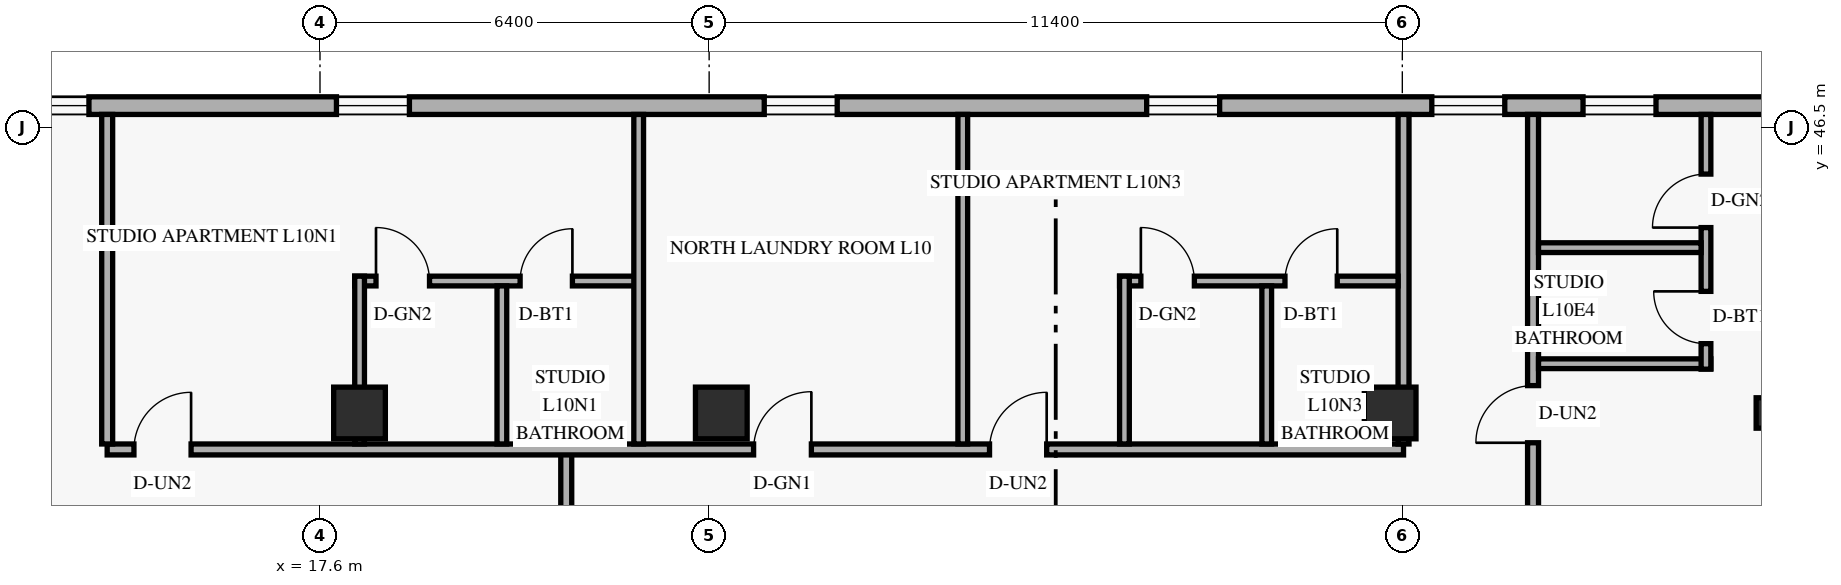
"""IFC4 building model, lengths in metres.
Left out: names, types, materials, properties, quantities, classifications, styles, units other than length and angle.
Written with IfcOpenShell. Run it as: python <this file> out.ifc"""

import sys

from ifc_helpers import new_model, si_unit, direction, frame, frame_2d, origin, origin_2d, place, context, subcontext, project, spatial, rectangle, hollow_rectangle, extrude, element, fill, save


model = new_model("IFC4")
c1 = context("Model", 3, precision=1e-05, world=origin(), true_north=direction((0.0, 1.0)))
c2 = subcontext(c1, "Body", "Model", "MODEL_VIEW")
j1 = project(units=[si_unit("LENGTHUNIT", "METRE"), si_unit("PLANEANGLEUNIT", "RADIAN")], contexts=[c1])
p1 = place(None, origin())
s1 = spatial("IfcSite", under=j1, at=p1, CompositionType="ELEMENT")
p2 = place(p1, origin())
s2 = spatial("IfcBuilding", under=s1, at=p2, CompositionType="ELEMENT")
p3 = place(p2, frame((0.0, 0.0, 42.0)))
s3 = spatial("IfcBuildingStorey", under=s2, at=p3, CompositionType="ELEMENT", Elevation=42.0)
for number, where, z_axis, x_axis in (
    (1, (18.25, 41.8, 0.0), (0.0, 0.0, 1.0), (1.0, 0.0, 0.0)),
    (2, (24.2, 41.8, 0.0), (0.0, 0.0, 1.0), (1.0, 0.0, 0.0)),
    (3, (35.2, 41.8, 0.0), (0.0, 0.0, 1.0), (1.0, 0.0, 0.0)),
):
    element("IfcColumn", number, at=place(p3, frame(where, z_axis=z_axis, x_axis=x_axis)), inside=s3, PredefinedType="COLUMN", context=c2, shape_type="SweptSolid", body=[
        extrude(rectangle(XDim=0.85, YDim=0.85, at=origin_2d()), origin(), (0.0, 0.0, 1.0), 3.6),
    ])
p4 = place(p3, frame((41.406, 41.8, 0.0), z_axis=(0.034971136209, 0.0, 0.999388322742), x_axis=(0.0, 1.0, 0.0)))
e4 = element("IfcColumn", 4, at=p4, inside=s3, PredefinedType="COLUMN", context=c2, shape_type="SweptSolid", body=[
    extrude(hollow_rectangle(XDim=0.5, YDim=0.5, WallThickness=0.022, at=origin_2d()), origin(), (0.0, 0.0, 1.0), 3.602),
])
p5 = place(p3, frame((44.98, 46.855, 0.0), z_axis=(0.0, 0.0, 1.0), x_axis=(-1.0, 0.0, 0.0)))
e5 = element("IfcWall", 5, at=p5, inside=s3, PredefinedType="SOLIDWALL", context=c2, shape_type="SweptSolid", body=[
    extrude(rectangle(XDim=39.56, YDim=0.29, at=frame_2d((19.78, 0.0))), origin(), (0.0, 0.0, 1.0), 3.36),
])
p6 = place(p5, frame((35.52, 0.0, 0.85)))
e6 = element("IfcOpeningElement", 6, at=p6, cuts=e5, PredefinedType="OPENING", context=c2, shape_type="SweptSolid", body=[
    extrude(rectangle(XDim=1.2, YDim=1.5, at=frame_2d((0.6, 0.75))), frame((0.0, 0.155, 0.0), z_axis=(0.0, -1.0, 0.0), x_axis=(1.0, 0.0, 0.0)), (0.0, 0.0, 1.0), 0.31),
])
p7 = place(p5, frame((31.18, 0.0, 0.85)))
e7 = element("IfcOpeningElement", 7, at=p7, cuts=e5, PredefinedType="OPENING", context=c2, shape_type="SweptSolid", body=[
    extrude(rectangle(XDim=1.2, YDim=1.5, at=frame_2d((0.6, 0.75))), frame((0.0, 0.155, 0.0), z_axis=(0.0, -1.0, 0.0), x_axis=(1.0, 0.0, 0.0)), (0.0, 0.0, 1.0), 0.31),
])
p8 = place(p5, frame((25.909, 0.0, 0.85)))
e8 = element("IfcOpeningElement", 8, at=p8, cuts=e5, PredefinedType="OPENING", context=c2, shape_type="SweptSolid", body=[
    extrude(rectangle(XDim=1.2, YDim=1.5, at=frame_2d((0.6, 0.75))), frame((0.0, 0.155, 0.0), z_axis=(0.0, -1.0, 0.0), x_axis=(1.0, 0.0, 0.0)), (0.0, 0.0, 1.0), 0.31),
])
p9 = place(p5, frame((18.874, 0.0, 0.85)))
e9 = element("IfcOpeningElement", 9, at=p9, cuts=e5, PredefinedType="OPENING", context=c2, shape_type="SweptSolid", body=[
    extrude(rectangle(XDim=1.2, YDim=1.5, at=frame_2d((0.6, 0.75))), frame((0.0, 0.155, 0.0), z_axis=(0.0, -1.0, 0.0), x_axis=(1.0, 0.0, 0.0)), (0.0, 0.0, 1.0), 0.31),
])
p10 = place(p5, frame((12.584, 0.0, 0.85)))
e10 = element("IfcOpeningElement", 10, at=p10, cuts=e5, PredefinedType="OPENING", context=c2, shape_type="SweptSolid", body=[
    extrude(rectangle(XDim=1.2, YDim=1.5, at=frame_2d((0.6, 0.75))), frame((0.0, 0.155, 0.0), z_axis=(0.0, -1.0, 0.0), x_axis=(1.0, 0.0, 0.0)), (0.0, 0.0, 1.0), 0.31),
])
p11 = place(p5, frame((7.895, 0.0, 0.85)))
e11 = element("IfcOpeningElement", 11, at=p11, cuts=e5, PredefinedType="OPENING", context=c2, shape_type="SweptSolid", body=[
    extrude(rectangle(XDim=1.2, YDim=1.5, at=frame_2d((0.6, 0.75))), frame((0.0, 0.155, 0.0), z_axis=(0.0, -1.0, 0.0), x_axis=(1.0, 0.0, 0.0)), (0.0, 0.0, 1.0), 0.31),
])
p12 = place(p5, frame((5.408, 0.0, 0.85)))
e12 = element("IfcOpeningElement", 12, at=p12, cuts=e5, PredefinedType="OPENING", context=c2, shape_type="SweptSolid", body=[
    extrude(rectangle(XDim=1.2, YDim=1.5, at=frame_2d((0.6, 0.75))), frame((0.0, 0.155, 0.0), z_axis=(0.0, -1.0, 0.0), x_axis=(1.0, 0.0, 0.0)), (0.0, 0.0, 1.0), 0.31),
])
p13 = place(p5, frame((1.693, 0.0, 0.85)))
e13 = element("IfcOpeningElement", 13, at=p13, cuts=e5, PredefinedType="OPENING", context=c2, shape_type="SweptSolid", body=[
    extrude(rectangle(XDim=1.2, YDim=1.5, at=frame_2d((0.6, 0.75))), frame((0.0, 0.155, 0.0), z_axis=(0.0, -1.0, 0.0), x_axis=(1.0, 0.0, 0.0)), (0.0, 0.0, 1.0), 0.31),
])
p14 = place(p3, frame((37.55, 1.29, 0.0), z_axis=(0.0, 0.0, 1.0), x_axis=(0.0, 1.0, 0.0)))
e14 = element("IfcWall", 14, at=p14, inside=s3, PredefinedType="STANDARD", context=c2, shape_type="SweptSolid", body=[
    extrude(rectangle(XDim=45.42, YDim=0.18, at=frame_2d((22.71, 0.0))), origin(), (0.0, 0.0, 1.0), 2.649),
])
p15 = place(p14, frame((4.46, 0.0, 0.0)))
e15 = element("IfcOpeningElement", 15, at=p15, cuts=e14, PredefinedType="OPENING", context=c2, shape_type="SweptSolid", body=[
    extrude(rectangle(XDim=0.94, YDim=2.15, at=frame_2d((0.47, 1.075))), frame((0.0, 0.1, 0.0), z_axis=(0.0, -1.0, 0.0), x_axis=(1.0, 0.0, 0.0)), (0.0, 0.0, 1.0), 0.2),
])
p16 = place(p14, frame((15.907, 0.0, 0.0)))
e16 = element("IfcOpeningElement", 16, at=p16, cuts=e14, PredefinedType="OPENING", context=c2, shape_type="SweptSolid", body=[
    extrude(rectangle(XDim=0.94, YDim=2.15, at=frame_2d((0.47, 1.075))), frame((0.0, 0.1, 0.0), z_axis=(0.0, -1.0, 0.0), x_axis=(1.0, 0.0, 0.0)), (0.0, 0.0, 1.0), 0.2),
])
p17 = place(p14, frame((28.23, 0.0, 0.0)))
e17 = element("IfcOpeningElement", 17, at=p17, cuts=e14, PredefinedType="OPENING", context=c2, shape_type="SweptSolid", body=[
    extrude(rectangle(XDim=0.94, YDim=2.15, at=frame_2d((0.47, 1.075))), frame((0.0, 0.1, 0.0), z_axis=(0.0, -1.0, 0.0), x_axis=(1.0, 0.0, 0.0)), (0.0, 0.0, 1.0), 0.2),
])
p18 = place(p14, frame((40.02, 0.0, 0.0)))
e18 = element("IfcOpeningElement", 18, at=p18, cuts=e14, PredefinedType="OPENING", context=c2, shape_type="SweptSolid", body=[
    extrude(rectangle(XDim=0.94, YDim=2.15, at=frame_2d((0.47, 1.075))), frame((0.0, 0.1, 0.0), z_axis=(0.0, -1.0, 0.0), x_axis=(1.0, 0.0, 0.0)), (0.0, 0.0, 1.0), 0.2),
])
p19 = place(p3, frame((21.65, 6.8, 0.0), z_axis=(0.0, 0.0, 1.0), x_axis=(0.0, 1.0, 0.0)))
e19 = element("IfcWall", 19, at=p19, inside=s3, PredefinedType="STANDARD", context=c2, shape_type="SweptSolid", body=[
    extrude(rectangle(XDim=34.4, YDim=0.18, at=frame_2d((17.2, 0.0))), origin(), (0.0, 0.0, 1.0), 2.649),
])
p20 = place(p3, frame((14.1, 41.2, 0.0), z_axis=(0.0, 0.0, 1.0), x_axis=(1.0, 0.0, 0.0)))
e20 = element("IfcWall", 20, at=p20, inside=s3, PredefinedType="STANDARD", context=c2, shape_type="SweptSolid", body=[
    extrude(rectangle(XDim=21.32, YDim=0.18, at=frame_2d((10.66, 0.0))), origin(), (0.0, 0.0, 1.0), 2.649),
])
p21 = place(p20, frame((0.44, 0.0, 0.0)))
e21 = element("IfcOpeningElement", 21, at=p21, cuts=e20, PredefinedType="OPENING", context=c2, shape_type="SweptSolid", body=[
    extrude(rectangle(XDim=0.94, YDim=2.15, at=frame_2d((0.47, 1.075))), frame((0.0, 0.1, 0.0), z_axis=(0.0, -1.0, 0.0), x_axis=(1.0, 0.0, 0.0)), (0.0, 0.0, 1.0), 0.2),
])
p22 = place(p20, frame((10.631, 0.0, 0.0)))
e22 = element("IfcOpeningElement", 22, at=p22, cuts=e20, PredefinedType="OPENING", context=c2, shape_type="SweptSolid", body=[
    extrude(rectangle(XDim=0.95, YDim=2.15, at=frame_2d((0.475, 1.075))), frame((0.0, 0.1, 0.0), z_axis=(0.0, -1.0, 0.0), x_axis=(1.0, 0.0, 0.0)), (0.0, 0.0, 1.0), 0.2),
])
p23 = place(p20, frame((14.511, 0.0, 0.0)))
e23 = element("IfcOpeningElement", 23, at=p23, cuts=e20, PredefinedType="OPENING", context=c2, shape_type="SweptSolid", body=[
    extrude(rectangle(XDim=0.94, YDim=2.15, at=frame_2d((0.47, 1.075))), frame((0.0, 0.1, 0.0), z_axis=(0.0, -1.0, 0.0), x_axis=(1.0, 0.0, 0.0)), (0.0, 0.0, 1.0), 0.2),
])
p24 = place(p3, frame((35.42, 41.29, 0.0), z_axis=(0.0, 0.0, 1.0), x_axis=(0.0, 1.0, 0.0)))
e24 = element("IfcWall", 24, at=p24, inside=s3, PredefinedType="PARTITIONING", context=c2, shape_type="SweptSolid", body=[
    extrude(rectangle(XDim=5.42, YDim=0.18, at=frame_2d((2.71, 0.0))), origin(), (0.0, 0.0, 1.0), 3.36),
])
p25 = place(p3, frame((14.1, 41.29, 0.0), z_axis=(0.0, 0.0, 1.0), x_axis=(0.0, 1.0, 0.0)))
e25 = element("IfcWall", 25, at=p25, inside=s3, PredefinedType="PARTITIONING", context=c2, shape_type="SweptSolid", body=[
    extrude(rectangle(XDim=5.42, YDim=0.18, at=frame_2d((2.71, 0.0))), origin(), (0.0, 0.0, 1.0), 2.809),
])
p26 = place(p3, frame((37.64, 42.61, 0.0), z_axis=(0.0, 0.0, 1.0), x_axis=(1.0, 0.0, 0.0)))
e26 = element("IfcWall", 26, at=p26, inside=s3, PredefinedType="PLUMBINGWALL", context=c2, shape_type="SweptSolid", body=[
    extrude(rectangle(XDim=2.834, YDim=0.16, at=frame_2d((1.417, 0.0))), origin(), (0.0, 0.0, 1.0), 3.36),
])
p27 = place(p3, frame((40.394, 42.52, 0.0), z_axis=(0.0, 0.0, 1.0), x_axis=(0.0, 1.0, 0.0)))
e27 = element("IfcWall", 27, at=p27, inside=s3, PredefinedType="PLUMBINGWALL", context=c2, shape_type="SweptSolid", body=[
    extrude(rectangle(XDim=4.19, YDim=0.16, at=frame_2d((2.095, 0.0))), origin(), (0.0, 0.0, 1.0), 3.36),
])
p28 = place(p27, frame((0.42, 0.0, 0.0)))
e28 = element("IfcOpeningElement", 28, at=p28, cuts=e27, PredefinedType="OPENING", context=c2, shape_type="SweptSolid", body=[
    extrude(rectangle(XDim=0.86, YDim=2.12, at=frame_2d((0.43, 1.06))), frame((0.0, 0.09, 0.0), z_axis=(0.0, -1.0, 0.0), x_axis=(1.0, 0.0, 0.0)), (0.0, 0.0, 1.0), 0.18),
])
p29 = place(p27, frame((2.329, 0.0, 0.0)))
e29 = element("IfcOpeningElement", 29, at=p29, cuts=e27, PredefinedType="OPENING", context=c2, shape_type="SweptSolid", body=[
    extrude(rectangle(XDim=0.88, YDim=2.12, at=frame_2d((0.44, 1.06))), frame((0.0, 0.09, 0.0), z_axis=(0.0, -1.0, 0.0), x_axis=(1.0, 0.0, 0.0)), (0.0, 0.0, 1.0), 0.18),
])
p30 = place(p3, frame((37.64, 44.519, 0.0), z_axis=(0.0, 0.0, 1.0), x_axis=(1.0, 0.0, 0.0)))
e30 = element("IfcWall", 30, at=p30, inside=s3, PredefinedType="PLUMBINGWALL", context=c2, shape_type="SweptSolid", body=[
    extrude(rectangle(XDim=2.674, YDim=0.16, at=frame_2d((1.337, 0.0))), origin(), (0.0, 0.0, 1.0), 3.36),
])
p31 = place(p3, frame((18.171, 43.97, 0.0), z_axis=(0.0, 0.0, 1.0), x_axis=(1.0, 0.0, 0.0)))
e31 = element("IfcWall", 31, at=p31, inside=s3, PredefinedType="PLUMBINGWALL", context=c2, shape_type="SweptSolid", body=[
    extrude(rectangle(XDim=4.67, YDim=0.16, at=frame_2d((2.335, 0.0))), origin(), (0.0, 0.0, 1.0), 3.36),
])
p32 = place(p31, frame((0.35, 0.0, 0.0)))
e32 = element("IfcOpeningElement", 32, at=p32, cuts=e31, PredefinedType="OPENING", context=c2, shape_type="SweptSolid", body=[
    extrude(rectangle(XDim=0.88, YDim=2.12, at=frame_2d((0.44, 1.06))), frame((0.0, 0.09, 0.0), z_axis=(0.0, -1.0, 0.0), x_axis=(1.0, 0.0, 0.0)), (0.0, 0.0, 1.0), 0.18),
])
p33 = place(p31, frame((2.72, 0.0, 0.0)))
e33 = element("IfcOpeningElement", 33, at=p33, cuts=e31, PredefinedType="OPENING", context=c2, shape_type="SweptSolid", body=[
    extrude(rectangle(XDim=0.86, YDim=2.12, at=frame_2d((0.43, 1.06))), frame((0.0, 0.09, 0.0), z_axis=(0.0, -1.0, 0.0), x_axis=(1.0, 0.0, 0.0)), (0.0, 0.0, 1.0), 0.18),
])
p34 = place(p3, frame((18.251, 41.29, 0.0), z_axis=(0.0, 0.0, 1.0), x_axis=(0.0, 1.0, 0.0)))
e34 = element("IfcWall", 34, at=p34, inside=s3, PredefinedType="PLUMBINGWALL", context=c2, shape_type="SweptSolid", body=[
    extrude(rectangle(XDim=2.76, YDim=0.16, at=frame_2d((1.38, 0.0))), origin(), (0.0, 0.0, 1.0), 2.649),
])
p35 = place(p3, frame((20.591, 41.29, 0.0), z_axis=(0.0, 0.0, 1.0), x_axis=(0.0, 1.0, 0.0)))
e35 = element("IfcWall", 35, at=p35, inside=s3, PredefinedType="PLUMBINGWALL", context=c2, shape_type="SweptSolid", body=[
    extrude(rectangle(XDim=2.6, YDim=0.16, at=frame_2d((1.3, 0.0))), origin(), (0.0, 0.0, 1.0), 2.809),
])
for number, where, z_axis, x_axis in (
    (36, (22.841, 41.29, 0.0), (0.0, 0.0, 1.0), (0.0, 1.0, 0.0)),
    (37, (28.171, 41.29, 0.0), (0.0, 0.0, 1.0), (0.0, 1.0, 0.0)),
):
    element("IfcWall", number, at=place(p3, frame(where, z_axis=z_axis, x_axis=x_axis)), inside=s3, PredefinedType="PARTITIONING", context=c2, shape_type="SweptSolid", body=[
        extrude(rectangle(XDim=5.42, YDim=0.16, at=frame_2d((2.71, 0.0))), origin(), (0.0, 0.0, 1.0), 2.809),
    ])
p36 = place(p3, frame((30.75, 43.97, 0.0), z_axis=(0.0, 0.0, 1.0), x_axis=(1.0, 0.0, 0.0)))
e38 = element("IfcWall", 38, at=p36, inside=s3, PredefinedType="PLUMBINGWALL", context=c2, shape_type="SweptSolid", body=[
    extrude(rectangle(XDim=4.58, YDim=0.16, at=frame_2d((2.29, 0.0))), origin(), (0.0, 0.0, 1.0), 3.36),
])
p37 = place(p36, frame((0.35, 0.0, 0.0)))
e39 = element("IfcOpeningElement", 39, at=p37, cuts=e38, PredefinedType="OPENING", context=c2, shape_type="SweptSolid", body=[
    extrude(rectangle(XDim=0.88, YDim=2.12, at=frame_2d((0.44, 1.06))), frame((0.0, 0.09, 0.0), z_axis=(0.0, -1.0, 0.0), x_axis=(1.0, 0.0, 0.0)), (0.0, 0.0, 1.0), 0.18),
])
p38 = place(p36, frame((2.72, 0.0, 0.0)))
e40 = element("IfcOpeningElement", 40, at=p38, cuts=e38, PredefinedType="OPENING", context=c2, shape_type="SweptSolid", body=[
    extrude(rectangle(XDim=0.86, YDim=2.12, at=frame_2d((0.43, 1.06))), frame((0.0, 0.09, 0.0), z_axis=(0.0, -1.0, 0.0), x_axis=(1.0, 0.0, 0.0)), (0.0, 0.0, 1.0), 0.18),
])
p39 = place(p3, frame((30.83, 41.29, 0.0), z_axis=(0.0, 0.0, 1.0), x_axis=(0.0, 1.0, 0.0)))
e41 = element("IfcWall", 41, at=p39, inside=s3, PredefinedType="PLUMBINGWALL", context=c2, shape_type="SweptSolid", body=[
    extrude(rectangle(XDim=2.76, YDim=0.16, at=frame_2d((1.38, 0.0))), origin(), (0.0, 0.0, 1.0), 2.809),
])
p40 = place(p3, frame((33.17, 41.29, 0.0), z_axis=(0.0, 0.0, 1.0), x_axis=(0.0, 1.0, 0.0)))
e42 = element("IfcWall", 42, at=p40, inside=s3, PredefinedType="PLUMBINGWALL", context=c2, shape_type="SweptSolid", body=[
    extrude(rectangle(XDim=2.6, YDim=0.16, at=frame_2d((1.3, 0.0))), origin(), (0.0, 0.0, 1.0), 2.809),
])
p41 = place(p7, origin())
e43 = element("IfcWindow", 43, at=p41, inside=s3, PartitioningType="SINGLE_PANEL", PredefinedType="WINDOW", context=c2, shape_type="SweptSolid", body=[
    extrude(rectangle(XDim=1.2, YDim=1.5, at=frame_2d((0.6, 0.75))), frame((0.0, 0.03, 0.0), z_axis=(0.0, -1.0, 0.0), x_axis=(1.0, 0.0, 0.0)), (0.0, 0.0, 1.0), 0.06),
])
fill(e7, e43)
p42 = place(p8, origin())
e44 = element("IfcWindow", 44, at=p42, inside=s3, PartitioningType="SINGLE_PANEL", PredefinedType="WINDOW", context=c2, shape_type="SweptSolid", body=[
    extrude(rectangle(XDim=1.2, YDim=1.5, at=frame_2d((0.6, 0.75))), frame((0.0, 0.03, 0.0), z_axis=(0.0, -1.0, 0.0), x_axis=(1.0, 0.0, 0.0)), (0.0, 0.0, 1.0), 0.06),
])
fill(e8, e44)
p43 = place(p9, origin())
e45 = element("IfcWindow", 45, at=p43, inside=s3, PartitioningType="SINGLE_PANEL", PredefinedType="WINDOW", context=c2, shape_type="SweptSolid", body=[
    extrude(rectangle(XDim=1.2, YDim=1.5, at=frame_2d((0.6, 0.75))), frame((0.0, 0.03, 0.0), z_axis=(0.0, -1.0, 0.0), x_axis=(1.0, 0.0, 0.0)), (0.0, 0.0, 1.0), 0.06),
])
fill(e9, e45)
p44 = place(p10, origin())
e46 = element("IfcWindow", 46, at=p44, inside=s3, PartitioningType="SINGLE_PANEL", PredefinedType="WINDOW", context=c2, shape_type="SweptSolid", body=[
    extrude(rectangle(XDim=1.2, YDim=1.5, at=frame_2d((0.6, 0.75))), frame((0.0, 0.03, 0.0), z_axis=(0.0, -1.0, 0.0), x_axis=(1.0, 0.0, 0.0)), (0.0, 0.0, 1.0), 0.06),
])
fill(e10, e46)
p45 = place(p11, origin())
e47 = element("IfcWindow", 47, at=p45, inside=s3, PartitioningType="SINGLE_PANEL", PredefinedType="WINDOW", context=c2, shape_type="SweptSolid", body=[
    extrude(rectangle(XDim=1.2, YDim=1.5, at=frame_2d((0.6, 0.75))), frame((0.0, 0.03, 0.0), z_axis=(0.0, -1.0, 0.0), x_axis=(1.0, 0.0, 0.0)), (0.0, 0.0, 1.0), 0.06),
])
fill(e11, e47)
p46 = place(p12, origin())
e48 = element("IfcWindow", 48, at=p46, inside=s3, PartitioningType="SINGLE_PANEL", PredefinedType="WINDOW", context=c2, shape_type="SweptSolid", body=[
    extrude(rectangle(XDim=1.2, YDim=1.5, at=frame_2d((0.6, 0.75))), frame((0.0, 0.03, 0.0), z_axis=(0.0, -1.0, 0.0), x_axis=(1.0, 0.0, 0.0)), (0.0, 0.0, 1.0), 0.06),
])
fill(e12, e48)
p47 = place(p18, origin())
e49 = element("IfcDoor", 49, at=p47, inside=s3, OperationType="SINGLE_SWING_LEFT", PredefinedType="DOOR", context=c2, shape_type="SweptSolid", body=[
    extrude(rectangle(XDim=0.94, YDim=2.15, at=frame_2d((0.47, 1.075))), frame((0.0, 0.025, 0.0), z_axis=(0.0, -1.0, 0.0), x_axis=(1.0, 0.0, 0.0)), (0.0, 0.0, 1.0), 0.05),
])
fill(e18, e49)
p48 = place(p28, origin())
e50 = element("IfcDoor", 50, at=p48, inside=s3, OperationType="SINGLE_SWING_RIGHT", PredefinedType="DOOR", context=c2, shape_type="SweptSolid", body=[
    extrude(rectangle(XDim=0.86, YDim=2.12, at=frame_2d((0.43, 1.06))), frame((0.0, 0.025, 0.0), z_axis=(0.0, -1.0, 0.0), x_axis=(1.0, 0.0, 0.0)), (0.0, 0.0, 1.0), 0.05),
])
fill(e28, e50)
p49 = place(p29, origin())
e51 = element("IfcDoor", 51, at=p49, inside=s3, OperationType="SINGLE_SWING_LEFT", PredefinedType="DOOR", context=c2, shape_type="SweptSolid", body=[
    extrude(rectangle(XDim=0.88, YDim=2.12, at=frame_2d((0.44, 1.06))), frame((0.0, 0.025, 0.0), z_axis=(0.0, -1.0, 0.0), x_axis=(1.0, 0.0, 0.0)), (0.0, 0.0, 1.0), 0.05),
])
fill(e29, e51)
p50 = place(p21, origin())
e52 = element("IfcDoor", 52, at=p50, inside=s3, OperationType="SINGLE_SWING_RIGHT", PredefinedType="DOOR", context=c2, shape_type="SweptSolid", body=[
    extrude(rectangle(XDim=0.94, YDim=2.15, at=frame_2d((0.47, 1.075))), frame((0.0, 0.025, 0.0), z_axis=(0.0, -1.0, 0.0), x_axis=(1.0, 0.0, 0.0)), (0.0, 0.0, 1.0), 0.05),
])
fill(e21, e52)
p51 = place(p32, origin())
e53 = element("IfcDoor", 53, at=p51, inside=s3, OperationType="SINGLE_SWING_LEFT", PredefinedType="DOOR", context=c2, shape_type="SweptSolid", body=[
    extrude(rectangle(XDim=0.88, YDim=2.12, at=frame_2d((0.44, 1.06))), frame((0.0, 0.025, 0.0), z_axis=(0.0, -1.0, 0.0), x_axis=(1.0, 0.0, 0.0)), (0.0, 0.0, 1.0), 0.05),
])
fill(e32, e53)
p52 = place(p33, origin())
e54 = element("IfcDoor", 54, at=p52, inside=s3, OperationType="SINGLE_SWING_RIGHT", PredefinedType="DOOR", context=c2, shape_type="SweptSolid", body=[
    extrude(rectangle(XDim=0.86, YDim=2.12, at=frame_2d((0.43, 1.06))), frame((0.0, 0.025, 0.0), z_axis=(0.0, -1.0, 0.0), x_axis=(1.0, 0.0, 0.0)), (0.0, 0.0, 1.0), 0.05),
])
fill(e33, e54)
p53 = place(p22, origin())
e55 = element("IfcDoor", 55, at=p53, inside=s3, OperationType="SINGLE_SWING_RIGHT", PredefinedType="DOOR", context=c2, shape_type="SweptSolid", body=[
    extrude(rectangle(XDim=0.95, YDim=2.15, at=frame_2d((0.475, 1.075))), frame((0.0, 0.025, 0.0), z_axis=(0.0, -1.0, 0.0), x_axis=(1.0, 0.0, 0.0)), (0.0, 0.0, 1.0), 0.05),
])
fill(e22, e55)
p54 = place(p23, origin())
e56 = element("IfcDoor", 56, at=p54, inside=s3, OperationType="SINGLE_SWING_RIGHT", PredefinedType="DOOR", context=c2, shape_type="SweptSolid", body=[
    extrude(rectangle(XDim=0.94, YDim=2.15, at=frame_2d((0.47, 1.075))), frame((0.0, 0.025, 0.0), z_axis=(0.0, -1.0, 0.0), x_axis=(1.0, 0.0, 0.0)), (0.0, 0.0, 1.0), 0.05),
])
fill(e23, e56)
p55 = place(p37, origin())
e57 = element("IfcDoor", 57, at=p55, inside=s3, OperationType="SINGLE_SWING_LEFT", PredefinedType="DOOR", context=c2, shape_type="SweptSolid", body=[
    extrude(rectangle(XDim=0.88, YDim=2.12, at=frame_2d((0.44, 1.06))), frame((0.0, 0.025, 0.0), z_axis=(0.0, -1.0, 0.0), x_axis=(1.0, 0.0, 0.0)), (0.0, 0.0, 1.0), 0.05),
])
fill(e39, e57)
p56 = place(p38, origin())
e58 = element("IfcDoor", 58, at=p56, inside=s3, OperationType="SINGLE_SWING_RIGHT", PredefinedType="DOOR", context=c2, shape_type="SweptSolid", body=[
    extrude(rectangle(XDim=0.86, YDim=2.12, at=frame_2d((0.43, 1.06))), frame((0.0, 0.025, 0.0), z_axis=(0.0, -1.0, 0.0), x_axis=(1.0, 0.0, 0.0)), (0.0, 0.0, 1.0), 0.05),
])
fill(e40, e58)
save(model, sys.argv[1])
